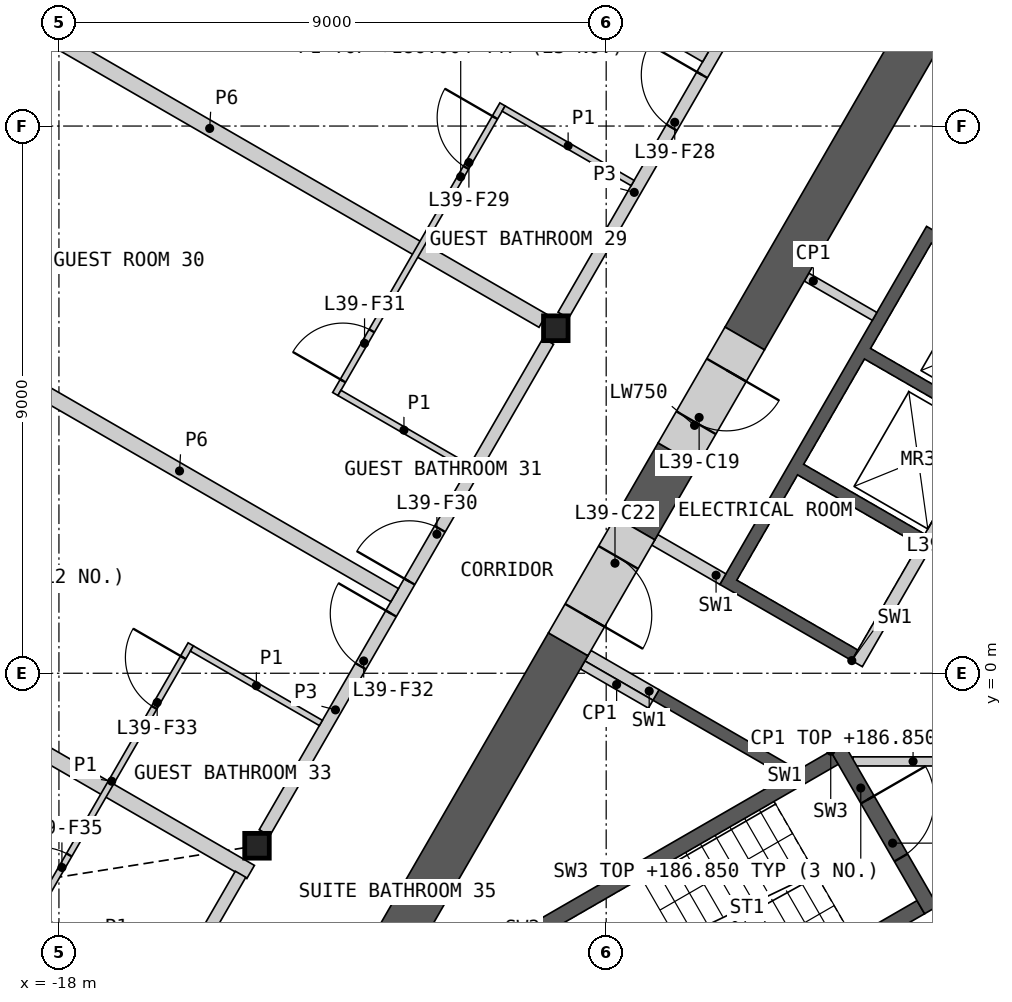
"""IFC4 building model, lengths in metres.
Left out: names, types, materials, properties, quantities, classifications, styles, units other than length and angle.
Written with IfcOpenShell. Run it as: python <this file> out.ifc"""

import sys

from ifc_helpers import new_model, si_unit, direction, frame, frame_2d, origin, origin_2d, place, context, subcontext, project, spatial, polyline, rectangle, i_section, outline, extrude, element, fill, save


model = new_model("IFC4")
c1 = context("Model", 3, precision=1e-05, world=origin(), true_north=direction((0.0, 1.0)))
c2 = subcontext(c1, "Body", "Model", "MODEL_VIEW")
j1 = project(units=[si_unit("LENGTHUNIT", "METRE"), si_unit("PLANEANGLEUNIT", "RADIAN")], contexts=[c1])
p1 = place(None, origin())
s1 = spatial("IfcSite", under=j1, at=p1, CompositionType="ELEMENT")
p2 = place(p1, origin())
s2 = spatial("IfcBuilding", under=s1, at=p2, CompositionType="ELEMENT")
p3 = place(p2, frame((0.0, 0.0, 183.6)))
s3 = spatial("IfcBuildingStorey", under=s2, at=p3, CompositionType="ELEMENT", Elevation=183.6)
for number, where, z_axis, x_axis in (
    (1, (-9.828, 5.675, 0.0), (0.0, 0.0, 1.0), (1.0, 0.0, 0.0)),
    (2, (-14.743, -2.837, 0.0), (0.0, 0.0, 1.0), (1.0, 0.0, 0.0)),
):
    element("IfcColumn", number, at=place(p3, frame(where, z_axis=z_axis, x_axis=x_axis)), inside=s3, PredefinedType="COLUMN", context=c2, shape_type="SweptSolid", body=[
        extrude(i_section(OverallWidth=0.404, OverallDepth=0.407, WebThickness=0.027, FlangeThickness=0.044, at=origin_2d()), origin(), (0.0, 0.0, 1.0), 3.6),
    ])
p4 = place(p3, origin())
e3 = element("IfcWall", 3, at=p4, inside=s3, PredefinedType="SHEAR", context=c2, shape_type="SweptSolid", body=[
    extrude(outline(polyline([(-6.061, -1.697), (-8.231, -0.444), (-8.131, -0.271), (-5.96, -1.524), (-6.061, -1.697)])), origin(), (0.0, 0.0, 1.0), 3.25),
])
p5 = place(p3, origin())
e4 = element("IfcWall", 4, at=p5, inside=s3, PredefinedType="SHEAR", context=c2, shape_type="SweptSolid", body=[
    extrude(outline(polyline([(-4.96, 0.208), (-7.131, 1.461), (-3.731, 7.35), (-1.561, 6.097), (-1.66, 5.924), (-3.652, 7.074), (-4.652, 5.342), (-2.66, 4.192), (-2.76, 4.019), (-4.752, 5.169), (-5.752, 3.437), (-3.76, 2.287), (-3.861, 2.113), (-5.852, 3.263), (-6.852, 1.531), (-4.861, 0.381), (-4.96, 0.208)])), origin(), (0.0, 0.0, 1.0), 3.25),
])
p6 = place(p3, frame((-1.631, 5.776, 0.0), z_axis=(0.0, 0.0, 1.0), x_axis=(-0.499992876559, -0.866029516466, 0.0)))
e5 = element("IfcWall", 5, at=p6, inside=s3, PredefinedType="SOLIDWALL", context=c2, shape_type="SweptSolid", body=[
    extrude(rectangle(XDim=6.486, YDim=0.2, at=frame_2d((3.243, 0.0))), origin(), (0.0, 0.0, 1.0), 3.25),
])
p7 = place(p6, frame((0.337, 0.0, 0.0)))
e6 = element("IfcOpeningElement", 6, at=p7, cuts=e5, PredefinedType="OPENING", context=c2, shape_type="SweptSolid", body=[
    extrude(rectangle(XDim=1.1, YDim=2.1, at=frame_2d((0.55, 1.05))), frame((0.0, 0.11, 0.0), z_axis=(0.0, -1.0, 0.0), x_axis=(1.0, 0.0, 0.0)), (0.0, 0.0, 1.0), 0.22),
])
p8 = place(p6, frame((2.537, 0.0, 0.0)))
e7 = element("IfcOpeningElement", 7, at=p8, cuts=e5, PredefinedType="OPENING", context=c2, shape_type="SweptSolid", body=[
    extrude(rectangle(XDim=1.1, YDim=2.1, at=frame_2d((0.55, 1.05))), frame((0.0, 0.11, 0.0), z_axis=(0.0, -1.0, 0.0), x_axis=(1.0, 0.0, 0.0)), (0.0, 0.0, 1.0), 0.22),
])
for number, where, z_axis, x_axis in (
    (8, (-7.081, 1.548, 0.0), (0.0, 0.0, 1.0), (-0.866, 0.5, 0.0)),
    (9, (-8.181, -0.357, 0.0), (0.0, 0.0, 1.0), (-0.866, 0.5, 0.0)),
):
    element("IfcWall", number, at=place(p3, frame(where, z_axis=z_axis, x_axis=x_axis)), inside=s3, PredefinedType="SHEAR", context=c2, shape_type="SweptSolid", body=[
        extrude(rectangle(XDim=1.293, YDim=0.2, at=frame_2d((0.646, 0.0))), origin(), (0.0, 0.0, 1.0), 3.25),
    ])
p9 = place(p3, frame((-4.941, -1.45, 0.0), z_axis=(0.0, 0.0, 1.0), x_axis=(1.0, 0.0, 0.0)))
e10 = element("IfcWall", 10, at=p9, inside=s3, PredefinedType="PARTITIONING", context=c2, shape_type="SweptSolid", body=[
    extrude(rectangle(XDim=9.882, YDim=0.15, at=frame_2d((4.941, 0.0))), origin(), (0.0, 0.0, 1.0), 3.25),
])
p10 = place(p9, frame((4.391, 0.0, 0.0)))
e11 = element("IfcOpeningElement", 11, at=p10, cuts=e10, PredefinedType="OPENING", context=c2, shape_type="SweptSolid", body=[
    extrude(rectangle(XDim=1.1, YDim=2.1, at=frame_2d((0.55, 1.05))), frame((0.0, 0.085, 0.0), z_axis=(0.0, -1.0, 0.0), x_axis=(1.0, 0.0, 0.0)), (0.0, 0.0, 1.0), 0.17),
])
p11 = place(p3, origin())
e12 = element("IfcWall", 12, at=p11, inside=s3, PredefinedType="SHEAR", context=c2, shape_type="SweptSolid", body=[
    extrude(outline(polyline([(-5.307, -1.281), (-10.374, -4.206), (-10.032, -4.298), (-5.182, -1.498), (-5.307, -1.281)])), origin(), (0.0, 0.0, 1.0), 3.25),
])
p12 = place(p3, origin())
e13 = element("IfcWall", 13, at=p12, inside=s3, PredefinedType="SHEAR", context=c2, shape_type="SweptSolid", body=[
    extrude(outline(polyline([(-8.738, -6.539), (-8.83, -6.881), (-3.763, -3.956), (-3.888, -3.739), (-8.738, -6.539)])), origin(), (0.0, 0.0, 1.0), 3.25),
])
p13 = place(p3, frame((-5.199, -1.219, 0.0), z_axis=(0.0, 0.0, 1.0), x_axis=(0.499982516597, -0.866035497597, 0.0)))
e14 = element("IfcWall", 14, at=p13, inside=s3, PredefinedType="SHEAR", context=c2, shape_type="SweptSolid", body=[
    extrude(rectangle(XDim=3.088, YDim=0.25, at=frame_2d((1.544, 0.0))), origin(), (0.0, 0.0, 1.0), 3.25),
])
p14 = place(p13, frame((0.994, 0.0, 0.0)))
e15 = element("IfcOpeningElement", 15, at=p14, cuts=e14, PredefinedType="OPENING", context=c2, shape_type="SweptSolid", body=[
    extrude(rectangle(XDim=1.1, YDim=2.1, at=frame_2d((0.55, 1.05))), frame((0.0, 0.135, 0.0), z_axis=(0.0, -1.0, 0.0), x_axis=(1.0, 0.0, 0.0)), (0.0, 0.0, 1.0), 0.27),
])
for number, where, z_axis, x_axis in (
    (16, (-8.268, -0.509, 0.0), (0.0, 0.0, 1.0), (-0.866, 0.5, 0.0)),
    (17, (-5.705, 6.516, 0.0), (0.0, 0.0, 1.0), (0.866, -0.5, 0.0)),
):
    element("IfcWall", number, at=place(p3, frame(where, z_axis=z_axis, x_axis=x_axis)), inside=s3, PredefinedType="PARTITIONING", context=c2, shape_type="SweptSolid", body=[
        extrude(rectangle(XDim=1.293, YDim=0.15, at=frame_2d((0.646, 0.0))), origin(), (0.0, 0.0, 1.0), 3.25),
    ])
p15 = place(p3, frame((-9.625, 0.477, 0.0), z_axis=(0.0, 0.0, 1.0), x_axis=(-0.499986234705, -0.866033351035, 0.0)))
e18 = element("IfcWall", 18, at=p15, inside=s3, PredefinedType="SHEAR", context=c2, shape_type="SweptSolid", body=[
    extrude(rectangle(XDim=9.801, YDim=0.75, at=frame_2d((4.9, 0.0))), origin(), (0.0, 0.0, 1.0), 3.25),
])
p16 = place(p3, frame((-2.622, 12.606, 0.0), z_axis=(0.0, 0.0, 1.0), x_axis=(-0.500014611105, -0.866016967894, 0.0)))
e19 = element("IfcWall", 19, at=p16, inside=s3, PredefinedType="SHEAR", context=c2, shape_type="SweptSolid", body=[
    extrude(rectangle(XDim=8.198, YDim=0.75, at=frame_2d((4.099, 0.0))), origin(), (0.0, 0.0, 1.0), 3.25),
])
p17 = place(p3, frame((-7.821, 3.601, 0.0), z_axis=(0.0, 0.0, 1.0), x_axis=(-0.49996263964, -0.866046972724, 0.0)))
e20 = element("IfcWall", 20, at=p17, inside=s3, PredefinedType="SHEAR", context=c2, shape_type="SweptSolid", body=[
    extrude(rectangle(XDim=1.408, YDim=0.75, at=frame_2d((0.704, 0.0))), origin(), (0.0, 0.0, 1.0), 3.25),
])
p18 = place(p3, frame((-6.721, 5.506, 0.0), z_axis=(0.0, 0.0, 1.0), x_axis=(-0.499946605688, -0.86605622881, 0.0)))
e21 = element("IfcWall", 21, at=p18, inside=s3, PredefinedType="SHEAR", context=c2, shape_type="SweptSolid", body=[
    extrude(rectangle(XDim=2.2, YDim=0.75, at=frame_2d((1.1, 0.0))), origin(), (0.0, 0.0, 1.0), 3.25),
])
p19 = place(p18, frame((0.6, 0.0, 0.0)))
e22 = element("IfcOpeningElement", 22, at=p19, cuts=e21, PredefinedType="OPENING", context=c2, shape_type="SweptSolid", body=[
    extrude(rectangle(XDim=1.0, YDim=2.1, at=frame_2d((0.5, 1.05))), frame((0.0, 0.385, 0.0), z_axis=(0.0, -1.0, 0.0), x_axis=(1.0, 0.0, 0.0)), (0.0, 0.0, 1.0), 0.77),
])
p20 = place(p3, frame((-8.525, 2.382, 0.0), z_axis=(0.0, 0.0, 1.0), x_axis=(-0.500077893725, -0.86598042715, 0.0)))
e23 = element("IfcWall", 23, at=p20, inside=s3, PredefinedType="SHEAR", context=c2, shape_type="SweptSolid", body=[
    extrude(rectangle(XDim=2.2, YDim=0.75, at=frame_2d((1.1, 0.0))), origin(), (0.0, 0.0, 1.0), 3.25),
])
p21 = place(p20, frame((0.55, 0.0, 0.0)))
e24 = element("IfcOpeningElement", 24, at=p21, cuts=e23, PredefinedType="OPENING", context=c2, shape_type="SweptSolid", body=[
    extrude(rectangle(XDim=1.1, YDim=2.1, at=frame_2d((0.55, 1.05))), frame((0.0, 0.385, 0.0), z_axis=(0.0, -1.0, 0.0), x_axis=(1.0, 0.0, 0.0)), (0.0, 0.0, 1.0), 0.77),
])
p22 = place(p3, frame((-26.164, 3.265, 0.0), z_axis=(0.0, 0.0, 1.0), x_axis=(0.866021313335, -0.500007084799, 0.0)))
e25 = element("IfcWall", 25, at=p22, inside=s3, PredefinedType="PARTITIONING", context=c2, shape_type="SweptSolid", body=[
    extrude(rectangle(XDim=13.068, YDim=0.25, at=frame_2d((6.534, 0.0))), origin(), (0.0, 0.0, 1.0), 2.404),
])
p23 = place(p3, frame((-21.0, 12.124, 0.0), z_axis=(0.0, 0.0, 1.0), x_axis=(0.866025883649, -0.499999168849, 0.0)))
e26 = element("IfcWall", 26, at=p23, inside=s3, PredefinedType="PARTITIONING", context=c2, shape_type="SweptSolid", body=[
    extrude(rectangle(XDim=12.652, YDim=0.25, at=frame_2d((6.326, 0.0))), origin(), (0.0, 0.0, 1.0), 2.404),
])
p24 = place(p3, frame((-9.705, 5.888, 0.0), z_axis=(0.0, 0.0, 1.0), x_axis=(0.50000393355, 0.866023132736, 0.0)))
e27 = element("IfcWall", 27, at=p24, inside=s3, PredefinedType="PARTITIONING", context=c2, shape_type="SweptSolid", body=[
    extrude(rectangle(XDim=9.335, YDim=0.2, at=frame_2d((4.667, 0.0))), origin(), (0.0, 0.0, 1.0), 3.25),
])
p25 = place(p24, frame((5.172, 0.0, 0.0)))
e28 = element("IfcOpeningElement", 28, at=p25, cuts=e27, PredefinedType="OPENING", context=c2, shape_type="SweptSolid", body=[
    extrude(rectangle(XDim=1.0, YDim=2.1, at=frame_2d((0.5, 1.05))), frame((0.0, 0.11, 0.0), z_axis=(0.0, -1.0, 0.0), x_axis=(1.0, 0.0, 0.0)), (0.0, 0.0, 1.0), 0.22),
])
p26 = place(p24, frame((3.565, 0.0, 0.0)))
e29 = element("IfcOpeningElement", 29, at=p26, cuts=e27, PredefinedType="OPENING", context=c2, shape_type="SweptSolid", body=[
    extrude(rectangle(XDim=1.0, YDim=2.1, at=frame_2d((0.5, 1.05))), frame((0.0, 0.11, 0.0), z_axis=(0.0, -1.0, 0.0), x_axis=(1.0, 0.0, 0.0)), (0.0, 0.0, 1.0), 0.22),
])
p27 = place(p3, frame((-14.619, -2.624, 0.0), z_axis=(0.0, 0.0, 1.0), x_axis=(0.50000393355, 0.866023132736, 0.0)))
e30 = element("IfcWall", 30, at=p27, inside=s3, PredefinedType="PARTITIONING", context=c2, shape_type="SweptSolid", body=[
    extrude(rectangle(XDim=9.335, YDim=0.2, at=frame_2d((4.667, 0.0))), origin(), (0.0, 0.0, 1.0), 3.25),
])
p28 = place(p27, frame((4.77, 0.0, 0.0)))
e31 = element("IfcOpeningElement", 31, at=p28, cuts=e30, PredefinedType="OPENING", context=c2, shape_type="SweptSolid", body=[
    extrude(rectangle(XDim=1.0, YDim=2.1, at=frame_2d((0.5, 1.05))), frame((0.0, 0.11, 0.0), z_axis=(0.0, -1.0, 0.0), x_axis=(1.0, 0.0, 0.0)), (0.0, 0.0, 1.0), 0.22),
])
p29 = place(p27, frame((3.163, 0.0, 0.0)))
e32 = element("IfcOpeningElement", 32, at=p29, cuts=e30, PredefinedType="OPENING", context=c2, shape_type="SweptSolid", body=[
    extrude(rectangle(XDim=1.0, YDim=2.1, at=frame_2d((0.5, 1.05))), frame((0.0, 0.11, 0.0), z_axis=(0.0, -1.0, 0.0), x_axis=(1.0, 0.0, 0.0)), (0.0, 0.0, 1.0), 0.22),
])
p30 = place(p3, frame((-19.555, 5.37, 0.0), z_axis=(0.0, 0.0, 1.0), x_axis=(0.866024371346, -0.500001788232, 0.0)))
e33 = element("IfcWall", 33, at=p30, inside=s3, PredefinedType="PARTITIONING", context=c2, shape_type="SweptSolid", body=[
    extrude(rectangle(XDim=8.171, YDim=0.25, at=frame_2d((4.085, 0.0))), origin(), (0.0, 0.0, 1.0), 2.404),
])
p31 = place(p3, frame((-14.39, 14.228, 0.0), z_axis=(0.0, 0.0, 1.0), x_axis=(0.866031008936, -0.499990291468, 0.0)))
e34 = element("IfcWall", 34, at=p31, inside=s3, PredefinedType="PARTITIONING", context=c2, shape_type="SweptSolid", body=[
    extrude(rectangle(XDim=8.127, YDim=0.25, at=frame_2d((4.063, 0.0))), origin(), (0.0, 0.0, 1.0), 2.404),
])
p32 = place(p3, frame((-17.744, -8.035, 0.0), z_axis=(0.0, 0.0, 1.0), x_axis=(0.49998041698, 0.866036709751, 0.0)))
e35 = element("IfcWall", 35, at=p32, inside=s3, PredefinedType="PARTITIONING", context=c2, shape_type="SweptSolid", body=[
    extrude(rectangle(XDim=5.462, YDim=0.2, at=frame_2d((2.731, 0.0))), origin(), (0.0, 0.0, 1.0), 3.25),
])
p33 = place(p32, frame((0.352, 0.0, 0.0)))
e36 = element("IfcOpeningElement", 36, at=p33, cuts=e35, PredefinedType="OPENING", context=c2, shape_type="SweptSolid", body=[
    extrude(rectangle(XDim=1.1, YDim=2.1, at=frame_2d((0.55, 1.05))), frame((0.0, 0.11, 0.0), z_axis=(0.0, -1.0, 0.0), x_axis=(1.0, 0.0, 0.0)), (0.0, 0.0, 1.0), 0.22),
])
p34 = place(p3, frame((-13.455, 4.593, 0.0), z_axis=(0.0, 0.0, 1.0), x_axis=(0.500015767406, 0.866016300277, 0.0)))
e37 = element("IfcWall", 37, at=p34, inside=s3, PredefinedType="PARTITIONING", context=c2, shape_type="SweptSolid", body=[
    extrude(rectangle(XDim=5.5, YDim=0.1, at=frame_2d((2.75, 0.0))), origin(), (0.0, 0.0, 1.0), 2.404),
])
p35 = place(p34, frame((4.3, 0.0, 0.0)))
e38 = element("IfcOpeningElement", 38, at=p35, cuts=e37, PredefinedType="OPENING", context=c2, shape_type="SweptSolid", body=[
    extrude(rectangle(XDim=0.95, YDim=2.1, at=frame_2d((0.475, 1.05))), frame((0.0, 0.06, 0.0), z_axis=(0.0, -1.0, 0.0), x_axis=(1.0, 0.0, 0.0)), (0.0, 0.0, 1.0), 0.12),
])
p36 = place(p34, frame((0.25, 0.0, 0.0)))
e39 = element("IfcOpeningElement", 39, at=p36, cuts=e37, PredefinedType="OPENING", context=c2, shape_type="SweptSolid", body=[
    extrude(rectangle(XDim=0.95, YDim=2.1, at=frame_2d((0.475, 1.05))), frame((0.0, 0.06, 0.0), z_axis=(0.0, -1.0, 0.0), x_axis=(1.0, 0.0, 0.0)), (0.0, 0.0, 1.0), 0.12),
])
p37 = place(p3, frame((-18.432, -4.028, 0.0), z_axis=(0.0, 0.0, 1.0), x_axis=(0.499992051641, 0.866029992723, 0.0)))
e40 = element("IfcWall", 40, at=p37, inside=s3, PredefinedType="PARTITIONING", context=c2, shape_type="SweptSolid", body=[
    extrude(rectangle(XDim=5.2, YDim=0.1, at=frame_2d((2.6, 0.0))), origin(), (0.0, 0.0, 1.0), 2.404),
])
p38 = place(p37, frame((4.0, 0.0, 0.0)))
e41 = element("IfcOpeningElement", 41, at=p38, cuts=e40, PredefinedType="OPENING", context=c2, shape_type="SweptSolid", body=[
    extrude(rectangle(XDim=0.95, YDim=2.1, at=frame_2d((0.475, 1.05))), frame((0.0, 0.06, 0.0), z_axis=(0.0, -1.0, 0.0), x_axis=(1.0, 0.0, 0.0)), (0.0, 0.0, 1.0), 0.12),
])
p39 = place(p37, frame((0.25, 0.0, 0.0)))
e42 = element("IfcOpeningElement", 42, at=p39, cuts=e40, PredefinedType="OPENING", context=c2, shape_type="SweptSolid", body=[
    extrude(rectangle(XDim=0.95, YDim=2.1, at=frame_2d((0.475, 1.05))), frame((0.0, 0.06, 0.0), z_axis=(0.0, -1.0, 0.0), x_axis=(1.0, 0.0, 0.0)), (0.0, 0.0, 1.0), 0.12),
])
p40 = place(p3, frame((-13.387, 4.611, 0.0), z_axis=(0.0, 0.0, 1.0), x_axis=(0.866032905446, -0.499987006516, 0.0)))
e43 = element("IfcWall", 43, at=p40, inside=s3, PredefinedType="PARTITIONING", context=c2, shape_type="SweptSolid", body=[
    extrude(rectangle(XDim=2.45, YDim=0.1, at=frame_2d((1.225, 0.0))), origin(), (0.0, 0.0, 1.0), 2.404),
])
for number, where, z_axis, x_axis in (
    (44, (-15.814, 0.407, 0.0), (0.0, 0.0, 1.0), (0.866, -0.5, 0.0)),
    (45, (-18.364, -4.01, 0.0), (0.0, 0.0, 1.0), (0.866, -0.5, 0.0)),
):
    element("IfcWall", number, at=place(p3, frame(where, z_axis=z_axis, x_axis=x_axis)), inside=s3, PredefinedType="PARTITIONING", context=c2, shape_type="SweptSolid", body=[
        extrude(rectangle(XDim=2.45, YDim=0.1, at=frame_2d((1.225, 0.0))), origin(), (0.0, 0.0, 1.0), 2.404),
    ])
p41 = place(p3, frame((-10.687, 9.288, 0.0), z_axis=(0.0, 0.0, 1.0), x_axis=(0.866032905446, -0.499987006516, 0.0)))
e46 = element("IfcWall", 46, at=p41, inside=s3, PredefinedType="PARTITIONING", context=c2, shape_type="SweptSolid", body=[
    extrude(rectangle(XDim=2.45, YDim=0.1, at=frame_2d((1.225, 0.0))), origin(), (0.0, 0.0, 1.0), 2.404),
])
p42 = place(p14, origin())
e47 = element("IfcDoor", 47, at=p42, inside=s3, OperationType="SINGLE_SWING_LEFT", PredefinedType="DOOR", context=c2, shape_type="SweptSolid", body=[
    extrude(rectangle(XDim=1.1, YDim=2.1, at=frame_2d((0.55, 1.05))), frame((0.0, 0.025, 0.0), z_axis=(0.0, -1.0, 0.0), x_axis=(1.0, 0.0, 0.0)), (0.0, 0.0, 1.0), 0.05),
])
fill(e15, e47)
p43 = place(p19, origin())
e48 = element("IfcDoor", 48, at=p43, inside=s3, OperationType="SINGLE_SWING_LEFT", PredefinedType="DOOR", context=c2, shape_type="SweptSolid", body=[
    extrude(rectangle(XDim=1.0, YDim=2.1, at=frame_2d((0.5, 1.05))), frame((0.0, 0.13, 0.0), z_axis=(0.0, -1.0, 0.0), x_axis=(1.0, 0.0, 0.0)), (0.0, 0.0, 1.0), 0.05),
])
fill(e22, e48)
p44 = place(p21, origin())
e49 = element("IfcDoor", 49, at=p44, inside=s3, OperationType="SINGLE_SWING_RIGHT", PredefinedType="DOOR", context=c2, shape_type="SweptSolid", body=[
    extrude(rectangle(XDim=1.1, YDim=2.1, at=frame_2d((0.55, 1.05))), frame((0.0, 0.13, 0.0), z_axis=(0.0, -1.0, 0.0), x_axis=(1.0, 0.0, 0.0)), (0.0, 0.0, 1.0), 0.05),
])
fill(e24, e49)
p45 = place(p26, origin())
e50 = element("IfcDoor", 50, at=p45, inside=s3, OperationType="SINGLE_SWING_RIGHT", PredefinedType="DOOR", context=c2, shape_type="SweptSolid", body=[
    extrude(rectangle(XDim=1.0, YDim=2.1, at=frame_2d((0.5, 1.05))), frame((0.0, 0.025, 0.0), z_axis=(0.0, -1.0, 0.0), x_axis=(1.0, 0.0, 0.0)), (0.0, 0.0, 1.0), 0.05),
])
fill(e29, e50)
p46 = place(p35, origin())
e51 = element("IfcDoor", 51, at=p46, inside=s3, OperationType="SINGLE_SWING_RIGHT", PredefinedType="DOOR", context=c2, shape_type="SweptSolid", body=[
    extrude(rectangle(XDim=0.95, YDim=2.1, at=frame_2d((0.475, 1.05))), frame((0.0, 0.025, 0.0), z_axis=(0.0, -1.0, 0.0), x_axis=(1.0, 0.0, 0.0)), (0.0, 0.0, 1.0), 0.05),
])
fill(e38, e51)
p47 = place(p28, origin())
e52 = element("IfcDoor", 52, at=p47, inside=s3, OperationType="SINGLE_SWING_LEFT", PredefinedType="DOOR", context=c2, shape_type="SweptSolid", body=[
    extrude(rectangle(XDim=1.0, YDim=2.1, at=frame_2d((0.5, 1.05))), frame((0.0, 0.025, 0.0), z_axis=(0.0, -1.0, 0.0), x_axis=(1.0, 0.0, 0.0)), (0.0, 0.0, 1.0), 0.05),
])
fill(e31, e52)
p48 = place(p36, origin())
e53 = element("IfcDoor", 53, at=p48, inside=s3, OperationType="SINGLE_SWING_LEFT", PredefinedType="DOOR", context=c2, shape_type="SweptSolid", body=[
    extrude(rectangle(XDim=0.95, YDim=2.1, at=frame_2d((0.475, 1.05))), frame((0.0, 0.025, 0.0), z_axis=(0.0, -1.0, 0.0), x_axis=(1.0, 0.0, 0.0)), (0.0, 0.0, 1.0), 0.05),
])
fill(e39, e53)
p49 = place(p29, origin())
e54 = element("IfcDoor", 54, at=p49, inside=s3, OperationType="SINGLE_SWING_RIGHT", PredefinedType="DOOR", context=c2, shape_type="SweptSolid", body=[
    extrude(rectangle(XDim=1.0, YDim=2.1, at=frame_2d((0.5, 1.05))), frame((0.0, 0.025, 0.0), z_axis=(0.0, -1.0, 0.0), x_axis=(1.0, 0.0, 0.0)), (0.0, 0.0, 1.0), 0.05),
])
fill(e32, e54)
p50 = place(p38, origin())
e55 = element("IfcDoor", 55, at=p50, inside=s3, OperationType="SINGLE_SWING_RIGHT", PredefinedType="DOOR", context=c2, shape_type="SweptSolid", body=[
    extrude(rectangle(XDim=0.95, YDim=2.1, at=frame_2d((0.475, 1.05))), frame((0.0, 0.025, 0.0), z_axis=(0.0, -1.0, 0.0), x_axis=(1.0, 0.0, 0.0)), (0.0, 0.0, 1.0), 0.05),
])
fill(e41, e55)
p51 = place(p39, origin())
e56 = element("IfcDoor", 56, at=p51, inside=s3, OperationType="SINGLE_SWING_LEFT", PredefinedType="DOOR", context=c2, shape_type="SweptSolid", body=[
    extrude(rectangle(XDim=0.95, YDim=2.1, at=frame_2d((0.475, 1.05))), frame((0.0, 0.025, 0.0), z_axis=(0.0, -1.0, 0.0), x_axis=(1.0, 0.0, 0.0)), (0.0, 0.0, 1.0), 0.05),
])
fill(e42, e56)
save(model, sys.argv[1])
